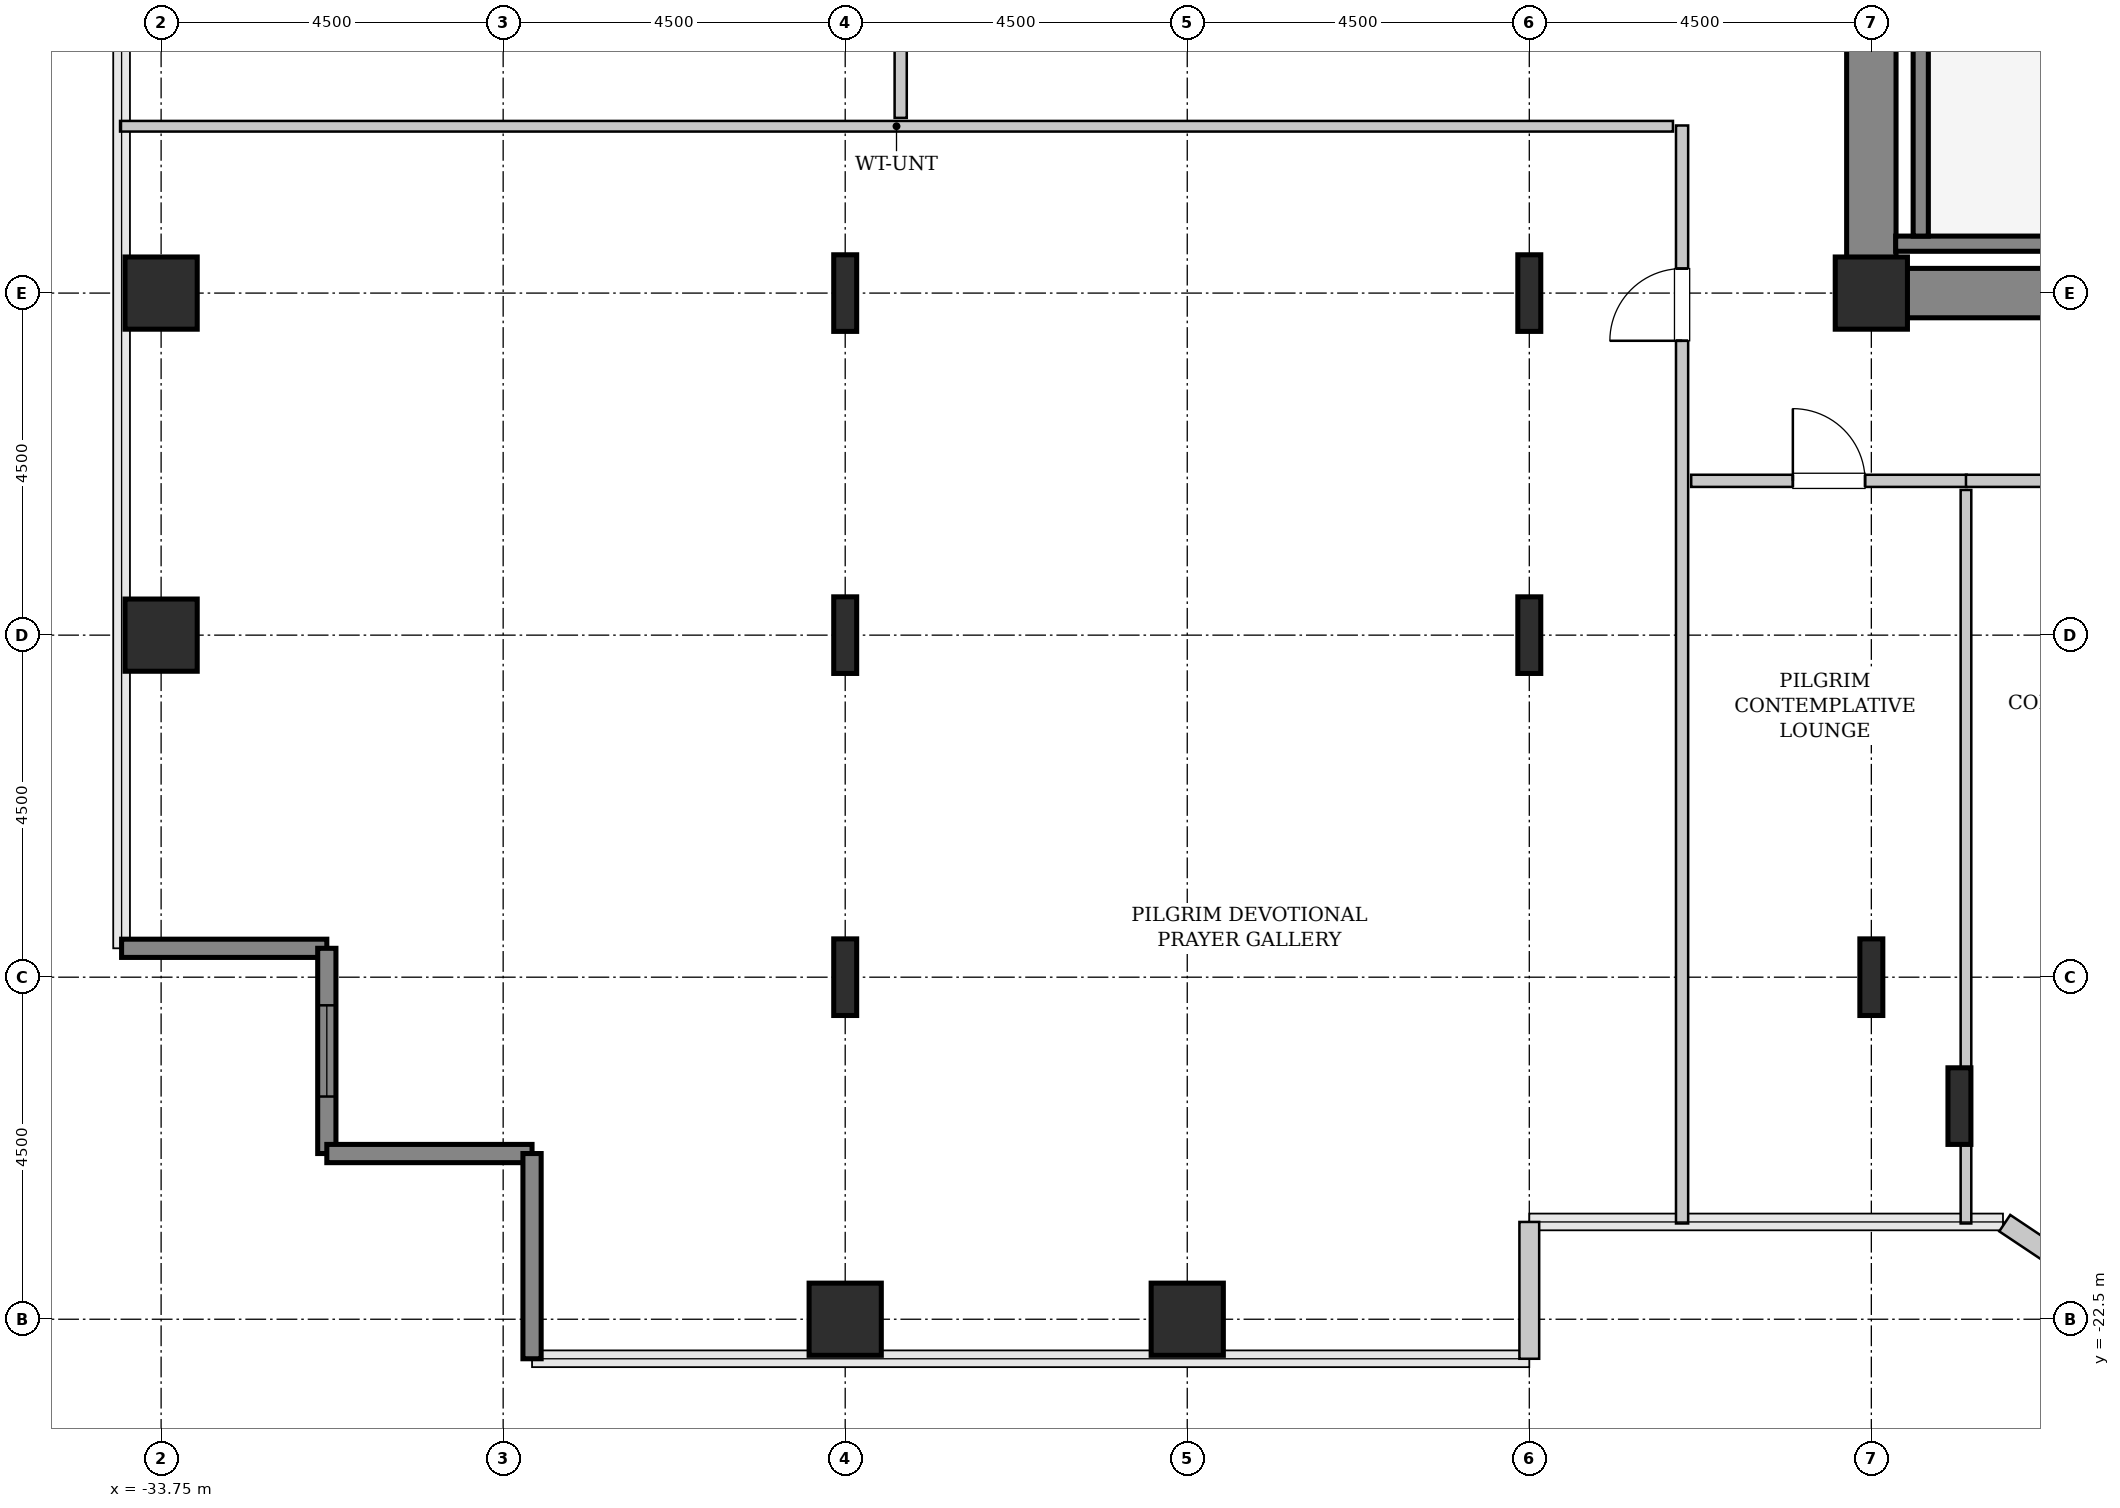
"""IFC4 building model, lengths in metres.
Left out: names, types, materials, properties, quantities, classifications, styles, units other than length and angle.
Written with IfcOpenShell. Run it as: python <this file> out.ifc"""

import sys

from ifc_helpers import new_model, si_unit, direction, frame, frame_2d, origin, origin_2d, place, context, subcontext, project, spatial, rectangle, hollow_rectangle, i_section, extrude, source, transform, mapped, element, fill, save


model = new_model("IFC4")
c1 = context("Model", 3, precision=1e-05, world=origin(), true_north=direction((0.0, 1.0)))
c2 = subcontext(c1, "Body", "Model", "MODEL_VIEW")
j1 = project(units=[si_unit("LENGTHUNIT", "METRE"), si_unit("PLANEANGLEUNIT", "RADIAN")], contexts=[c1])
p1 = place(None, origin())
s1 = spatial("IfcSite", under=j1, at=p1, CompositionType="ELEMENT")
p2 = place(p1, origin())
s2 = spatial("IfcBuilding", under=s1, at=p2, CompositionType="ELEMENT")
p3 = place(p2, frame((0.0, 0.0, 82.4)))
s3 = spatial("IfcBuildingStorey", under=s2, at=p3, CompositionType="ELEMENT", Elevation=82.4)
m1 = source(origin(), c2, "Body", "SweptSolid", [
    extrude(rectangle(XDim=10.025, YDim=0.65, at=frame_2d((5.012, 0.0))), origin(), (0.0, 0.0, 1.0), 3.8),
])
p4 = place(p3, frame((-11.575, -9.0, 0.0), z_axis=(0.0, 0.0, 1.0), x_axis=(1.0, 0.0, 0.0)))
e1 = element("IfcWall", 1, at=p4, inside=s3, PredefinedType="SHEAR", context=c2, shape_type="MappedRepresentation", body=[
    mapped(m1, transform((0.0, 0.0, 0.0), x_axis=(1.0, 0.0, 0.0), y_axis=(0.0, 1.0, 0.0), z_axis=(0.0, 0.0, 1.0), scale=1.0)),
])
m2 = source(origin(), c2, "Body", "SweptSolid", [
    extrude(rectangle(XDim=7.325, YDim=0.65, at=frame_2d((3.663, 0.0))), origin(), (0.0, 0.0, 1.0), 3.8),
])
p5 = place(p3, frame((-11.25, -8.675, 0.0), z_axis=(0.0, 0.0, 1.0), x_axis=(0.0, 1.0, 0.0)))
e2 = element("IfcWall", 2, at=p5, inside=s3, PredefinedType="SHEAR", context=c2, shape_type="MappedRepresentation", body=[
    mapped(m2, transform((0.0, 0.0, 0.0), x_axis=(1.0, 0.0, 0.0), y_axis=(0.0, 1.0, 0.0), z_axis=(0.0, 0.0, 1.0), scale=1.0)),
])
m3 = source(origin(), c2, "Body", "SweptSolid", [
    extrude(hollow_rectangle(XDim=0.95, YDim=0.95, WallThickness=0.045, InnerFilletRadius=0.045, OuterFilletRadius=0.09, at=origin_2d()), origin(), (0.0, 0.0, 1.0), 3.8),
])
for number, where, z_axis, x_axis in (
    (3, (-33.75, -13.5, 0.0), (0.0, 0.0, 1.0), (1.0, 0.0, 0.0)),
    (4, (-33.75, -9.0, 0.0), (0.0, 0.0, 1.0), (1.0, 0.0, 0.0)),
    (5, (-24.75, -22.5, 0.0), (0.0, 0.0, 1.0), (1.0, 0.0, 0.0)),
):
    element("IfcColumn", number, at=place(p3, frame(where, z_axis=z_axis, x_axis=x_axis)), inside=s3, PredefinedType="COLUMN", context=c2, shape_type="MappedRepresentation", body=[
        mapped(m3, transform((0.0, 0.0, 0.0), x_axis=(1.0, 0.0, 0.0), y_axis=(0.0, 1.0, 0.0), z_axis=(0.0, 0.0, 1.0), scale=1.0)),
    ])
m4 = source(origin(), c2, "Body", "SweptSolid", [
    extrude(i_section(OverallWidth=0.302, OverallDepth=1.008, WebThickness=0.021, FlangeThickness=0.04, FilletRadius=0.03, at=origin_2d()), origin(), (0.0, 0.0, 1.0), 3.8),
])
for number, where, z_axis, x_axis in (
    (6, (-24.75, -18.0, 0.0), (0.0, 0.0, 1.0), (1.0, 0.0, 0.0)),
    (7, (-24.75, -13.5, 0.0), (0.0, 0.0, 1.0), (1.0, 0.0, 0.0)),
    (8, (-24.75, -9.0, 0.0), (0.0, 0.0, 1.0), (1.0, 0.0, 0.0)),
):
    element("IfcColumn", number, at=place(p3, frame(where, z_axis=z_axis, x_axis=x_axis)), inside=s3, PredefinedType="COLUMN", context=c2, shape_type="MappedRepresentation", body=[
        mapped(m4, transform((0.0, 0.0, 0.0), x_axis=(1.0, 0.0, 0.0), y_axis=(0.0, 1.0, 0.0), z_axis=(0.0, 0.0, 1.0), scale=1.0)),
    ])
p6 = place(p3, frame((-20.25, -22.5, 0.0), z_axis=(0.0, 0.0, 1.0), x_axis=(1.0, 0.0, 0.0)))
e9 = element("IfcColumn", 9, at=p6, inside=s3, PredefinedType="COLUMN", context=c2, shape_type="MappedRepresentation", body=[
    mapped(m3, transform((0.0, 0.0, 0.0), x_axis=(1.0, 0.0, 0.0), y_axis=(0.0, 1.0, 0.0), z_axis=(0.0, 0.0, 1.0), scale=1.0)),
])
for number, where, z_axis, x_axis in (
    (10, (-15.75, -13.5, 0.0), (0.0, 0.0, 1.0), (1.0, 0.0, 0.0)),
    (11, (-15.75, -9.0, 0.0), (0.0, 0.0, 1.0), (1.0, 0.0, 0.0)),
    (12, (-11.25, -18.0, 0.0), (0.0, 0.0, 1.0), (1.0, 0.0, 0.0)),
):
    element("IfcColumn", number, at=place(p3, frame(where, z_axis=z_axis, x_axis=x_axis)), inside=s3, PredefinedType="COLUMN", context=c2, shape_type="MappedRepresentation", body=[
        mapped(m4, transform((0.0, 0.0, 0.0), x_axis=(1.0, 0.0, 0.0), y_axis=(0.0, 1.0, 0.0), z_axis=(0.0, 0.0, 1.0), scale=1.0)),
    ])
m5 = source(origin(), c2, "Body", "SweptSolid", [
    extrude(hollow_rectangle(XDim=0.95, YDim=0.95, WallThickness=0.045, InnerFilletRadius=0.045, OuterFilletRadius=0.09, at=origin_2d()), origin(), (0.0, 0.0, 1.0), 3.8),
])
p7 = place(p3, frame((-11.25, -9.0, 0.0), z_axis=(0.0, 0.0, 1.0), x_axis=(1.0, 0.0, 0.0)))
e13 = element("IfcColumn", 13, at=p7, inside=s3, PredefinedType="COLUMN", context=c2, shape_type="MappedRepresentation", body=[
    mapped(m5, transform((0.0, 0.0, 0.0), x_axis=(1.0, 0.0, 0.0), y_axis=(0.0, 1.0, 0.0), z_axis=(0.0, 0.0, 1.0), scale=1.0)),
])
p8 = place(p3, frame((-10.091, -19.696, 0.0), z_axis=(0.0, 0.0, 1.0), x_axis=(1.0, 0.0, 0.0)))
e14 = element("IfcColumn", 14, at=p8, inside=s3, PredefinedType="COLUMN", context=c2, shape_type="MappedRepresentation", body=[
    mapped(m4, transform((0.0, 0.0, 0.0), x_axis=(1.0, 0.0, 0.0), y_axis=(0.0, 1.0, 0.0), z_axis=(0.0, 0.0, 1.0), scale=1.0)),
])
m6 = source(origin(), c2, "Body", "SweptSolid", [
    extrude(rectangle(XDim=2.7, YDim=0.24, at=frame_2d((1.35, 0.0))), origin(), (0.0, 0.0, 1.0), 3.5),
])
p9 = place(p3, frame((-34.27, -17.62, 0.0), z_axis=(0.0, 0.0, 1.0), x_axis=(1.0, 0.0, 0.0)))
e15 = element("IfcWall", 15, at=p9, inside=s3, PredefinedType="SHEAR", context=c2, shape_type="MappedRepresentation", body=[
    mapped(m6, transform((0.0, 0.0, 0.0), x_axis=(1.0, 0.0, 0.0), y_axis=(0.0, 1.0, 0.0), z_axis=(0.0, 0.0, 1.0), scale=1.0)),
])
p10 = place(p3, frame((-31.57, -17.62, 0.0), z_axis=(0.0, 0.0, 1.0), x_axis=(0.0, -1.0, 0.0)))
e16 = element("IfcWall", 16, at=p10, inside=s3, PredefinedType="SHEAR", context=c2, shape_type="MappedRepresentation", body=[
    mapped(m6, transform((0.0, 0.0, 0.0), x_axis=(1.0, 0.0, 0.0), y_axis=(0.0, 1.0, 0.0), z_axis=(0.0, 0.0, 1.0), scale=1.0)),
])
p11 = place(p10, frame((0.75, 0.0, 0.85)))
e17 = element("IfcOpeningElement", 17, at=p11, cuts=e16, PredefinedType="OPENING", context=c2, shape_type="SweptSolid", body=[
    extrude(rectangle(XDim=1.2, YDim=1.8, at=frame_2d((0.6, 0.9))), frame((0.0, 0.13, 0.0), z_axis=(0.0, -1.0, 0.0), x_axis=(1.0, 0.0, 0.0)), (0.0, 0.0, 1.0), 0.26),
])
for number, where, z_axis, x_axis in (
    (18, (-31.57, -20.32, 0.0), (0.0, 0.0, 1.0), (1.0, 0.0, 0.0)),
    (19, (-28.87, -20.32, 0.0), (0.0, 0.0, 1.0), (0.0, -1.0, 0.0)),
):
    element("IfcWall", number, at=place(p3, frame(where, z_axis=z_axis, x_axis=x_axis)), inside=s3, PredefinedType="SHEAR", context=c2, shape_type="MappedRepresentation", body=[
        mapped(m6, transform((0.0, 0.0, 0.0), x_axis=(1.0, 0.0, 0.0), y_axis=(0.0, 1.0, 0.0), z_axis=(0.0, 0.0, 1.0), scale=1.0)),
    ])
m7 = source(origin(), c2, "Body", "SweptSolid", [
    extrude(rectangle(XDim=1.8, YDim=0.26, at=frame_2d((0.9, 0.0))), origin(), (0.0, 0.0, 1.0), 3.5),
])
p12 = place(p3, frame((-15.75, -23.02, 0.0), z_axis=(0.0, 0.0, 1.0), x_axis=(0.0, 1.0, 0.0)))
e20 = element("IfcWall", 20, at=p12, inside=s3, PredefinedType="SOLIDWALL", context=c2, shape_type="MappedRepresentation", body=[
    mapped(m7, transform((0.0, 0.0, 0.0), x_axis=(1.0, 0.0, 0.0), y_axis=(0.0, 1.0, 0.0), z_axis=(0.0, 0.0, 1.0), scale=1.0)),
])
m8 = source(origin(), c2, "Body", "SweptSolid", [
    extrude(rectangle(XDim=1.469, YDim=0.26, at=frame_2d((0.734, 0.0))), origin(), (0.0, 0.0, 1.0), 3.5),
])
p13 = place(p3, frame((-9.495, -21.236, 0.0), z_axis=(0.0, 0.0, 1.0), x_axis=(0.831461760506, -0.555581983884, 0.0)))
e21 = element("IfcWall", 21, at=p13, inside=s3, PredefinedType="SOLIDWALL", context=c2, shape_type="MappedRepresentation", body=[
    mapped(m8, transform((0.0, 0.0, 0.0), x_axis=(1.0, 0.0, 0.0), y_axis=(0.0, 1.0, 0.0), z_axis=(0.0, 0.0, 1.0), scale=1.0)),
])
m9 = source(origin(), c2, "Body", "SweptSolid", [
    extrude(rectangle(XDim=3.63, YDim=0.2, at=frame_2d((1.815, 0.0))), origin(), (0.0, 0.0, 1.0), 3.8),
])
p14 = place(p3, frame((-10.93, -8.35, 0.0), z_axis=(0.0, 0.0, 1.0), x_axis=(1.0, 0.0, 0.0)))
e22 = element("IfcWall", 22, at=p14, inside=s3, PredefinedType="SOLIDWALL", context=c2, shape_type="MappedRepresentation", body=[
    mapped(m9, transform((0.0, 0.0, 0.0), x_axis=(1.0, 0.0, 0.0), y_axis=(0.0, 1.0, 0.0), z_axis=(0.0, 0.0, 1.0), scale=1.0)),
])
m10 = source(origin(), c2, "Body", "SweptSolid", [
    extrude(rectangle(XDim=7.1, YDim=0.2, at=frame_2d((3.55, 0.0))), origin(), (0.0, 0.0, 1.0), 3.8),
])
p15 = place(p3, frame((-10.6, -1.15, 0.0), z_axis=(0.0, 0.0, 1.0), x_axis=(0.0, -1.0, 0.0)))
e23 = element("IfcWall", 23, at=p15, inside=s3, PredefinedType="SOLIDWALL", context=c2, shape_type="MappedRepresentation", body=[
    mapped(m10, transform((0.0, 0.0, 0.0), x_axis=(1.0, 0.0, 0.0), y_axis=(0.0, 1.0, 0.0), z_axis=(0.0, 0.0, 1.0), scale=1.0)),
])
m11 = source(origin(), c2, "Body", "SweptSolid", [
    extrude(rectangle(XDim=14.445, YDim=0.16, at=frame_2d((7.223, 0.0))), origin(), (0.0, 0.0, 1.0), 3.485),
])
p16 = place(p3, frame((-13.74, -21.24, 0.0), z_axis=(0.0, 0.0, 1.0), x_axis=(0.0, 1.0, 0.0)))
e24 = element("IfcWall", 24, at=p16, inside=s3, PredefinedType="PARTITIONING", context=c2, shape_type="MappedRepresentation", body=[
    mapped(m11, transform((0.0, 0.0, 0.0), x_axis=(1.0, 0.0, 0.0), y_axis=(0.0, 1.0, 0.0), z_axis=(0.0, 0.0, 1.0), scale=1.0)),
])
p17 = place(p16, frame((11.613, 0.0, 0.0)))
e25 = element("IfcOpeningElement", 25, at=p17, cuts=e24, PredefinedType="OPENING", context=c2, shape_type="SweptSolid", body=[
    extrude(rectangle(XDim=0.95, YDim=2.1, at=frame_2d((0.475, 1.05))), frame((0.0, 0.09, 0.0), z_axis=(0.0, -1.0, 0.0), x_axis=(1.0, 0.0, 0.0)), (0.0, 0.0, 1.0), 0.18),
])
m12 = source(origin(), c2, "Body", "SweptSolid", [
    extrude(rectangle(XDim=20.43, YDim=0.14, at=frame_2d((10.215, 0.0))), origin(), (0.0, 0.0, 1.0), 3.485),
])
p18 = place(p3, frame((-34.29, -6.805, 0.0), z_axis=(0.0, 0.0, 1.0), x_axis=(1.0, 0.0, 0.0)))
e26 = element("IfcWall", 26, at=p18, inside=s3, PredefinedType="PARTITIONING", context=c2, shape_type="MappedRepresentation", body=[
    mapped(m12, transform((0.0, 0.0, 0.0), x_axis=(1.0, 0.0, 0.0), y_axis=(0.0, 1.0, 0.0), z_axis=(0.0, 0.0, 1.0), scale=1.0)),
])
m13 = source(origin(), c2, "Body", "SweptSolid", [
    extrude(rectangle(XDim=14.683, YDim=0.16, at=frame_2d((7.341, 0.0))), origin(), (0.0, 0.0, 1.0), 3.485),
])
p19 = place(p3, frame((-24.02, -6.695, 0.0), z_axis=(0.0, 0.0, 1.0), x_axis=(0.0, 1.0, 0.0)))
e27 = element("IfcWall", 27, at=p19, inside=s3, PredefinedType="PARTITIONING", context=c2, shape_type="MappedRepresentation", body=[
    mapped(m13, transform((0.0, 0.0, 0.0), x_axis=(1.0, 0.0, 0.0), y_axis=(0.0, 1.0, 0.0), z_axis=(0.0, 0.0, 1.0), scale=1.0)),
])
p20 = place(p19, frame((3.97, 0.0, 0.0)))
e28 = element("IfcOpeningElement", 28, at=p20, cuts=e27, PredefinedType="OPENING", context=c2, shape_type="SweptSolid", body=[
    extrude(rectangle(XDim=0.95, YDim=2.1, at=frame_2d((0.475, 1.05))), frame((0.0, 0.09, 0.0), z_axis=(0.0, -1.0, 0.0), x_axis=(1.0, 0.0, 0.0)), (0.0, 0.0, 1.0), 0.18),
])
m14 = source(origin(), c2, "Body", "SweptSolid", [
    extrude(rectangle(XDim=3.625, YDim=0.16, at=frame_2d((1.812, 0.0))), origin(), (0.0, 0.0, 1.0), 3.485),
])
p21 = place(p3, frame((-13.62, -11.47, 0.0), z_axis=(0.0, 0.0, 1.0), x_axis=(1.0, 0.0, 0.0)))
e29 = element("IfcWall", 29, at=p21, inside=s3, PredefinedType="PARTITIONING", context=c2, shape_type="MappedRepresentation", body=[
    mapped(m14, transform((0.0, 0.0, 0.0), x_axis=(1.0, 0.0, 0.0), y_axis=(0.0, 1.0, 0.0), z_axis=(0.0, 0.0, 1.0), scale=1.0)),
])
p22 = place(p21, frame((1.337, 0.0, 0.0)))
e30 = element("IfcOpeningElement", 30, at=p22, cuts=e29, PredefinedType="OPENING", context=c2, shape_type="SweptSolid", body=[
    extrude(rectangle(XDim=0.95, YDim=2.1, at=frame_2d((0.475, 1.05))), frame((0.0, 0.09, 0.0), z_axis=(0.0, -1.0, 0.0), x_axis=(1.0, 0.0, 0.0)), (0.0, 0.0, 1.0), 0.18),
])
m15 = source(origin(), c2, "Body", "SweptSolid", [
    extrude(rectangle(XDim=9.65, YDim=0.14, at=frame_2d((4.825, 0.0))), origin(), (0.0, 0.0, 1.0), 3.485),
])
p23 = place(p3, frame((-10.005, -21.24, 0.0), z_axis=(0.0, 0.0, 1.0), x_axis=(0.0, 1.0, 0.0)))
e31 = element("IfcWall", 31, at=p23, inside=s3, PredefinedType="PARTITIONING", context=c2, shape_type="MappedRepresentation", body=[
    mapped(m15, transform((0.0, 0.0, 0.0), x_axis=(1.0, 0.0, 0.0), y_axis=(0.0, 1.0, 0.0), z_axis=(0.0, 0.0, 1.0), scale=1.0)),
])
m16 = source(origin(), c2, "Body", "SweptSolid", [
    extrude(rectangle(XDim=3.405, YDim=0.16, at=frame_2d((1.702, 0.0))), origin(), (0.0, 0.0, 1.0), 3.485),
])
p24 = place(p3, frame((-10.005, -11.47, 0.0), z_axis=(0.0, 0.0, 1.0), x_axis=(1.0, 0.0, 0.0)))
e32 = element("IfcWall", 32, at=p24, inside=s3, PredefinedType="PARTITIONING", context=c2, shape_type="MappedRepresentation", body=[
    mapped(m16, transform((0.0, 0.0, 0.0), x_axis=(1.0, 0.0, 0.0), y_axis=(0.0, 1.0, 0.0), z_axis=(0.0, 0.0, 1.0), scale=1.0)),
])
p25 = place(p24, frame((1.228, 0.0, 0.0)))
e33 = element("IfcOpeningElement", 33, at=p25, cuts=e32, PredefinedType="OPENING", context=c2, shape_type="SweptSolid", body=[
    extrude(rectangle(XDim=0.95, YDim=2.1, at=frame_2d((0.475, 1.05))), frame((0.0, 0.09, 0.0), z_axis=(0.0, -1.0, 0.0), x_axis=(1.0, 0.0, 0.0)), (0.0, 0.0, 1.0), 0.18),
])
m17 = source(origin(), c2, "Body", "SweptSolid", [
    extrude(rectangle(XDim=1.2, YDim=1.8, at=frame_2d((0.6, 0.9))), frame((0.0, 0.03, 0.0), z_axis=(0.0, -1.0, 0.0), x_axis=(1.0, 0.0, 0.0)), (0.0, 0.0, 1.0), 0.06),
])
p26 = place(p11, origin())
e34 = element("IfcWindow", 34, at=p26, inside=s3, PartitioningType="SINGLE_PANEL", PredefinedType="WINDOW", context=c2, shape_type="MappedRepresentation", body=[
    mapped(m17, transform((0.0, 0.0, 0.0), x_axis=(1.0, 0.0, 0.0), y_axis=(0.0, 1.0, 0.0), z_axis=(0.0, 0.0, 1.0), scale=1.0)),
])
fill(e17, e34)
m18 = source(origin(), c2, "Body", "SweptSolid", [
    extrude(rectangle(XDim=0.95, YDim=2.1, at=frame_2d((0.475, 1.05))), frame((0.0, 0.025, 0.0), z_axis=(0.0, -1.0, 0.0), x_axis=(1.0, 0.0, 0.0)), (0.0, 0.0, 1.0), 0.05),
])
p27 = place(p17, origin())
e35 = element("IfcDoor", 35, at=p27, inside=s3, OperationType="SINGLE_SWING_LEFT", PredefinedType="DOOR", context=c2, shape_type="MappedRepresentation", body=[
    mapped(m18, transform((0.0, 0.0, 0.0), x_axis=(1.0, 0.0, 0.0), y_axis=(0.0, 1.0, 0.0), z_axis=(0.0, 0.0, 1.0), scale=1.0)),
])
fill(e25, e35)
p28 = place(p22, origin())
e36 = element("IfcDoor", 36, at=p28, inside=s3, OperationType="SINGLE_SWING_LEFT", PredefinedType="DOOR", context=c2, shape_type="MappedRepresentation", body=[
    mapped(m18, transform((0.0, 0.0, 0.0), x_axis=(1.0, 0.0, 0.0), y_axis=(0.0, 1.0, 0.0), z_axis=(0.0, 0.0, 1.0), scale=1.0)),
])
fill(e30, e36)
save(model, sys.argv[1])
